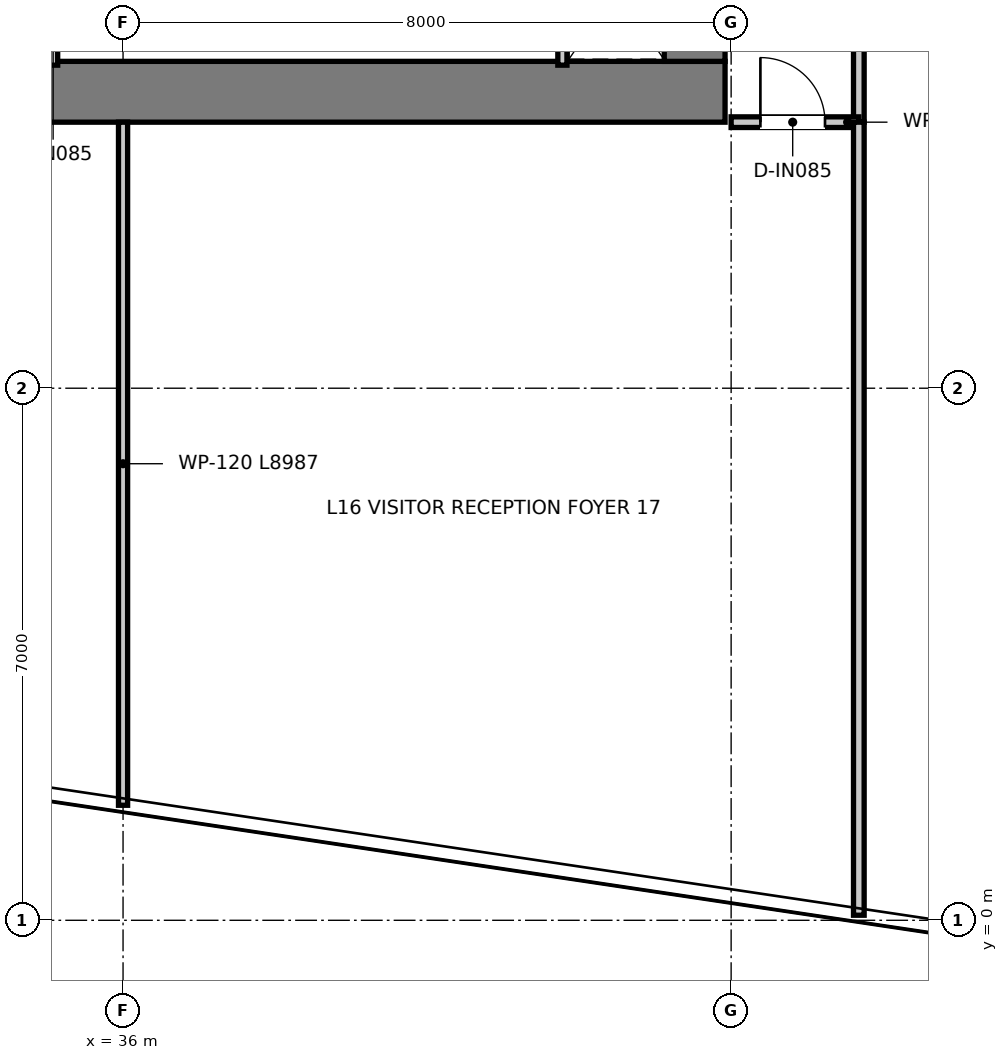
"""IFC4 building model, lengths in metres.
Left out: names, types, materials, properties, quantities, classifications, styles, units other than length and angle.
Written with IfcOpenShell. Run it as: python <this file> out.ifc"""

import sys

from ifc_helpers import new_model, si_unit, direction, frame, frame_2d, origin, place, context, subcontext, project, spatial, rectangle, extrude, element, fill, save


model = new_model("IFC4")
c1 = context("Model", 3, precision=1e-05, world=origin(), true_north=direction((0.0, 1.0)))
c2 = subcontext(c1, "Body", "Model", "MODEL_VIEW")
j1 = project(units=[si_unit("LENGTHUNIT", "METRE"), si_unit("PLANEANGLEUNIT", "RADIAN")], contexts=[c1])
p1 = place(None, origin())
s1 = spatial("IfcSite", under=j1, at=p1, CompositionType="ELEMENT")
p2 = place(p1, origin())
s2 = spatial("IfcBuilding", under=s1, at=p2, CompositionType="ELEMENT")
p3 = place(p2, frame((0.0, 0.0, 68.45)))
s3 = spatial("IfcBuildingStorey", under=s2, at=p3, CompositionType="ELEMENT", Elevation=68.45)
p4 = place(p3, frame((28.08, 10.9, 0.0), z_axis=(0.0, 0.0, 1.0), x_axis=(1.0, 0.0, 0.0)))
e1 = element("IfcWall", 1, at=p4, inside=s3, PredefinedType="SHEAR", context=c2, shape_type="SweptSolid", body=[
    extrude(rectangle(XDim=15.84, YDim=0.8, at=frame_2d((7.92, 0.0))), origin(), (0.0, 0.0, 1.0), 3.95),
])
p5 = place(p3, frame((43.52, 11.3, 0.0), z_axis=(0.0, 0.0, 1.0), x_axis=(0.0, 1.0, 0.0)))
e2 = element("IfcWall", 2, at=p5, inside=s3, PredefinedType="SHEAR", context=c2, shape_type="SweptSolid", body=[
    extrude(rectangle(XDim=14.7, YDim=0.8, at=frame_2d((7.35, 0.0))), origin(), (0.0, 0.0, 1.0), 3.95),
])
p6 = place(p3, frame((41.78, 11.25, 0.0), z_axis=(0.0, 0.0, 1.0), x_axis=(0.0, 1.0, 0.0)))
e3 = element("IfcWall", 3, at=p6, inside=s3, PredefinedType="PARTITIONING", context=c2, shape_type="SweptSolid", body=[
    extrude(rectangle(XDim=1.97, YDim=0.12, at=frame_2d((0.985, 0.0))), origin(), (0.0, 0.0, 1.0), 3.67),
])
p7 = place(p3, frame((35.08, 11.25, 0.0), z_axis=(0.0, 0.0, 1.0), x_axis=(0.0, 1.0, 0.0)))
e4 = element("IfcWall", 4, at=p7, inside=s3, PredefinedType="PARTITIONING", context=c2, shape_type="SweptSolid", body=[
    extrude(rectangle(XDim=1.97, YDim=0.12, at=frame_2d((0.985, 0.0))), origin(), (0.0, 0.0, 1.0), 3.67),
])
p8 = place(p7, frame((0.545, 0.0, 0.0)))
e5 = element("IfcOpeningElement", 5, at=p8, cuts=e4, PredefinedType="OPENING", context=c2, shape_type="SweptSolid", body=[
    extrude(rectangle(XDim=0.85, YDim=2.1, at=frame_2d((0.425, 1.05))), frame((0.0, 0.07, 0.0), z_axis=(0.0, -1.0, 0.0), x_axis=(1.0, 0.0, 0.0)), (0.0, 0.0, 1.0), 0.14),
])
p9 = place(p3, frame((45.68, 10.5, 0.0), z_axis=(0.0, 0.0, 1.0), x_axis=(0.0, 1.0, 0.0)))
e6 = element("IfcWall", 6, at=p9, inside=s3, PredefinedType="PARTITIONING", context=c2, shape_type="SweptSolid", body=[
    extrude(rectangle(XDim=25.62, YDim=0.14, at=frame_2d((12.81, 0.0))), origin(), (0.0, 0.0, 1.0), 2.97),
])
p10 = place(p9, frame((7.775, 0.0, 0.0)))
e7 = element("IfcOpeningElement", 7, at=p10, cuts=e6, PredefinedType="OPENING", context=c2, shape_type="SweptSolid", body=[
    extrude(rectangle(XDim=0.95, YDim=2.1, at=frame_2d((0.475, 1.05))), frame((0.0, 0.08, 0.0), z_axis=(0.0, -1.0, 0.0), x_axis=(1.0, 0.0, 0.0)), (0.0, 0.0, 1.0), 0.16),
])
p11 = place(p9, frame((11.275, 0.0, 0.0)))
e8 = element("IfcOpeningElement", 8, at=p11, cuts=e6, PredefinedType="OPENING", context=c2, shape_type="SweptSolid", body=[
    extrude(rectangle(XDim=0.95, YDim=2.1, at=frame_2d((0.475, 1.05))), frame((0.0, 0.08, 0.0), z_axis=(0.0, -1.0, 0.0), x_axis=(1.0, 0.0, 0.0)), (0.0, 0.0, 1.0), 0.16),
])
p12 = place(p9, frame((15.775, 0.0, 0.0)))
e9 = element("IfcOpeningElement", 9, at=p12, cuts=e6, PredefinedType="OPENING", context=c2, shape_type="SweptSolid", body=[
    extrude(rectangle(XDim=0.95, YDim=2.1, at=frame_2d((0.475, 1.05))), frame((0.0, 0.08, 0.0), z_axis=(0.0, -1.0, 0.0), x_axis=(1.0, 0.0, 0.0)), (0.0, 0.0, 1.0), 0.16),
])
p13 = place(p9, frame((20.125, 0.0, 0.0)))
e10 = element("IfcOpeningElement", 10, at=p13, cuts=e6, PredefinedType="OPENING", context=c2, shape_type="SweptSolid", body=[
    extrude(rectangle(XDim=0.95, YDim=2.1, at=frame_2d((0.475, 1.05))), frame((0.0, 0.08, 0.0), z_axis=(0.0, -1.0, 0.0), x_axis=(1.0, 0.0, 0.0)), (0.0, 0.0, 1.0), 0.16),
])
p14 = place(p9, frame((22.975, 0.0, 0.0)))
e11 = element("IfcOpeningElement", 11, at=p14, cuts=e6, PredefinedType="OPENING", context=c2, shape_type="SweptSolid", body=[
    extrude(rectangle(XDim=0.95, YDim=2.1, at=frame_2d((0.475, 1.05))), frame((0.0, 0.08, 0.0), z_axis=(0.0, -1.0, 0.0), x_axis=(1.0, 0.0, 0.0)), (0.0, 0.0, 1.0), 0.16),
])
p15 = place(p3, frame((44.0, 10.5, 0.0), z_axis=(0.0, 0.0, 1.0), x_axis=(1.0, 0.0, 0.0)))
e12 = element("IfcWall", 12, at=p15, inside=s3, PredefinedType="PARTITIONING", context=c2, shape_type="SweptSolid", body=[
    extrude(rectangle(XDim=1.68, YDim=0.14, at=frame_2d((0.84, 0.0))), origin(), (0.0, 0.0, 1.0), 3.67),
])
p16 = place(p15, frame((0.385, 0.0, 0.0)))
e13 = element("IfcOpeningElement", 13, at=p16, cuts=e12, PredefinedType="OPENING", context=c2, shape_type="SweptSolid", body=[
    extrude(rectangle(XDim=0.85, YDim=2.1, at=frame_2d((0.425, 1.05))), frame((0.0, 0.08, 0.0), z_axis=(0.0, -1.0, 0.0), x_axis=(1.0, 0.0, 0.0)), (0.0, 0.0, 1.0), 0.16),
])
p17 = place(p3, frame((45.68, 0.067, 0.0), z_axis=(0.0, 0.0, 1.0), x_axis=(0.0, 1.0, 0.0)))
e14 = element("IfcWall", 14, at=p17, inside=s3, PredefinedType="PARTITIONING", context=c2, shape_type="SweptSolid", body=[
    extrude(rectangle(XDim=10.433, YDim=0.14, at=frame_2d((5.217, 0.0))), origin(), (0.0, 0.0, 1.0), 3.67),
])
p18 = place(p3, frame((36.0, 1.513, 0.0), z_axis=(0.0, 0.0, 1.0), x_axis=(0.0, 1.0, 0.0)))
e15 = element("IfcWall", 15, at=p18, inside=s3, PredefinedType="PARTITIONING", context=c2, shape_type="SweptSolid", body=[
    extrude(rectangle(XDim=8.987, YDim=0.12, at=frame_2d((4.493, 0.0))), origin(), (0.0, 0.0, 1.0), 3.67),
])
p19 = place(p16, origin())
e16 = element("IfcDoor", 16, at=p19, inside=s3, OperationType="SINGLE_SWING_LEFT", PredefinedType="DOOR", context=c2, shape_type="SweptSolid", body=[
    extrude(rectangle(XDim=0.85, YDim=2.1, at=frame_2d((0.425, 1.05))), frame((0.0, 0.025, 0.0), z_axis=(0.0, -1.0, 0.0), x_axis=(1.0, 0.0, 0.0)), (0.0, 0.0, 1.0), 0.05),
])
fill(e13, e16)
save(model, sys.argv[1])
